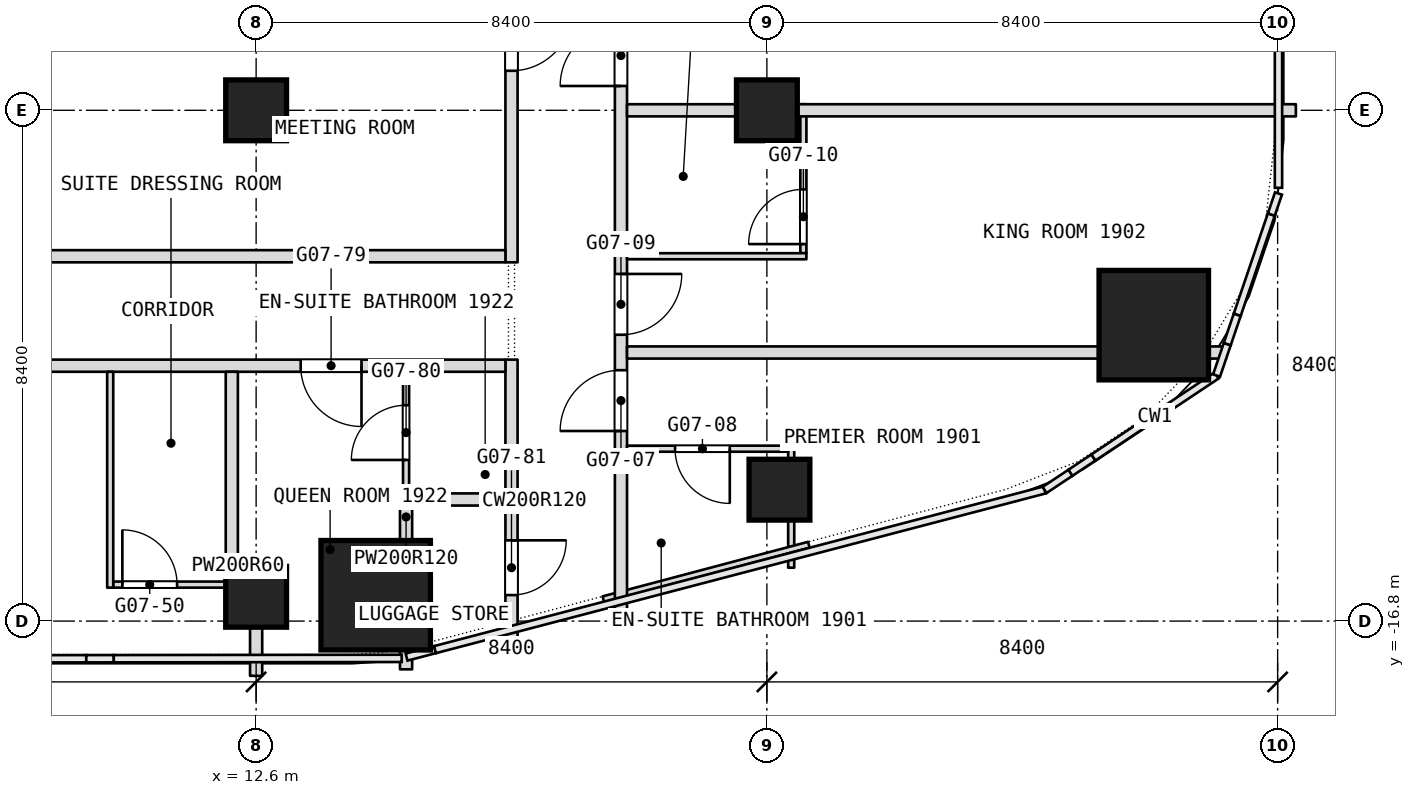
"""IFC4 building model, lengths in metres.
Left out: names, types, materials, properties, quantities, classifications, styles, units other than length and angle.
Written with IfcOpenShell. Run it as: python <this file> out.ifc"""

import sys

from ifc_helpers import new_model, si_unit, direction, frame, frame_2d, origin, origin_2d, place, context, subcontext, project, spatial, rectangle, extrude, element, fill, save


model = new_model("IFC4")
c1 = context("Model", 3, precision=1e-05, world=origin(), true_north=direction((0.0, 1.0)))
c2 = subcontext(c1, "Body", "Model", "MODEL_VIEW")
j1 = project(units=[si_unit("LENGTHUNIT", "METRE"), si_unit("PLANEANGLEUNIT", "RADIAN")], contexts=[c1])
p1 = place(None, origin())
s1 = spatial("IfcSite", under=j1, at=p1, CompositionType="ELEMENT")
p2 = place(p1, origin())
s2 = spatial("IfcBuilding", under=s1, at=p2, CompositionType="ELEMENT")
p3 = place(p2, frame((0.0, 0.0, 83.3)))
s3 = spatial("IfcBuildingStorey", under=s2, at=p3, CompositionType="ELEMENT", Elevation=83.3)
for number, where, z_axis, x_axis in (
    (1, (14.566, -16.375, 0.0), (0.0, 0.0, 1.0), (1.0, 0.0, 0.0)),
    (2, (27.363, -11.933, 0.0), (0.0, 0.0, 1.0), (1.0, 0.0, 0.0)),
):
    element("IfcColumn", number, at=place(p3, frame(where, z_axis=z_axis, x_axis=x_axis)), inside=s3, PredefinedType="COLUMN", context=c2, shape_type="SweptSolid", body=[
        extrude(rectangle(XDim=1.8, YDim=1.8, at=origin_2d()), origin(), (0.0, 0.0, 1.0), 3.6),
    ])
for number, where, z_axis, x_axis in (
    (3, (12.6, -8.4, 0.0), (0.0, 0.0, 1.0), (1.0, 0.0, 0.0)),
    (4, (21.0, -8.4, 0.0), (0.0, 0.0, 1.0), (1.0, 0.0, 0.0)),
    (5, (21.207, -14.639, 0.0), (0.0, 0.0, 1.0), (1.0, 0.0, 0.0)),
    (6, (12.6, -16.4, 0.0), (0.0, 0.0, 1.0), (1.0, 0.0, 0.0)),
):
    element("IfcColumn", number, at=place(p3, frame(where, z_axis=z_axis, x_axis=x_axis)), inside=s3, PredefinedType="COLUMN", context=c2, shape_type="SweptSolid", body=[
        extrude(rectangle(XDim=1.0, YDim=1.0, at=origin_2d()), origin(), (0.0, 0.0, 1.0), 3.6),
    ])
p4 = place(p3, frame((21.6, -10.75, 0.0), z_axis=(0.0, 0.0, 1.0), x_axis=(0.0, 1.0, 0.0)))
e7 = element("IfcWall", 7, at=p4, inside=s3, PredefinedType="PARTITIONING", context=c2, shape_type="SweptSolid", body=[
    extrude(rectangle(XDim=2.45, YDim=0.1, at=frame_2d((1.225, 0.0))), origin(), (0.0, 0.0, 1.0), 3.3),
])
p5 = place(p4, frame((0.15, 0.0, 0.0)))
e8 = element("IfcOpeningElement", 8, at=p5, cuts=e7, PredefinedType="OPENING", context=c2, shape_type="SweptSolid", body=[
    extrude(rectangle(XDim=0.9, YDim=2.1, at=frame_2d((0.45, 1.05))), frame((0.0, 0.05, 0.0), z_axis=(0.0, -1.0, 0.0), x_axis=(1.0, 0.0, 0.0)), (0.0, 0.0, 1.0), 0.1),
])
p6 = place(p3, frame((21.4, -15.922, 0.0), z_axis=(0.0, 0.0, 1.0), x_axis=(0.0, 1.0, 0.0)))
e9 = element("IfcWall", 9, at=p6, inside=s3, PredefinedType="PARTITIONING", context=c2, shape_type="SweptSolid", body=[
    extrude(rectangle(XDim=2.007, YDim=0.1, at=frame_2d((1.003, 0.0))), origin(), (0.0, 0.0, 1.0), 3.3),
])
p7 = place(p3, frame((18.31, -16.442, 0.0), z_axis=(0.0, 0.0, 1.0), x_axis=(0.966542484633, 0.25650657964, 0.0)))
e10 = element("IfcWall", 10, at=p7, inside=s3, PredefinedType="PARTITIONING", context=c2, shape_type="SweptSolid", body=[
    extrude(rectangle(XDim=3.497, YDim=0.1, at=frame_2d((1.749, 0.0))), origin(), (0.0, 0.0, 1.0), 3.3),
])
p8 = place(p3, frame((18.6, -16.665, 0.0), z_axis=(0.0, 0.0, 1.0), x_axis=(0.0, 1.0, 0.0)))
e11 = element("IfcWall", 11, at=p8, inside=s3, PredefinedType="PARTITIONING", context=c2, shape_type="SweptSolid", body=[
    extrude(rectangle(XDim=50.205, YDim=0.2, at=frame_2d((25.103, 0.0))), origin(), (0.0, 0.0, 1.0), 3.3),
])
p9 = place(p8, frame((2.991, 0.0, 0.0)))
e12 = element("IfcOpeningElement", 12, at=p9, cuts=e11, PredefinedType="OPENING", context=c2, shape_type="SweptSolid", body=[
    extrude(rectangle(XDim=1.0, YDim=2.1, at=frame_2d((0.5, 1.05))), frame((0.0, 0.1, 0.0), z_axis=(0.0, -1.0, 0.0), x_axis=(1.0, 0.0, 0.0)), (0.0, 0.0, 1.0), 0.2),
])
p10 = place(p8, frame((4.574, 0.0, 0.0)))
e13 = element("IfcOpeningElement", 13, at=p10, cuts=e11, PredefinedType="OPENING", context=c2, shape_type="SweptSolid", body=[
    extrude(rectangle(XDim=1.0, YDim=2.1, at=frame_2d((0.5, 1.05))), frame((0.0, 0.1, 0.0), z_axis=(0.0, -1.0, 0.0), x_axis=(1.0, 0.0, 0.0)), (0.0, 0.0, 1.0), 0.2),
])
p11 = place(p8, frame((8.665, 0.0, 0.0)))
e14 = element("IfcOpeningElement", 14, at=p11, cuts=e11, PredefinedType="OPENING", context=c2, shape_type="SweptSolid", body=[
    extrude(rectangle(XDim=1.0, YDim=2.1, at=frame_2d((0.5, 1.05))), frame((0.0, 0.1, 0.0), z_axis=(0.0, -1.0, 0.0), x_axis=(1.0, 0.0, 0.0)), (0.0, 0.0, 1.0), 0.2),
])
p12 = place(p8, frame((15.265, 0.0, 0.0)))
e15 = element("IfcOpeningElement", 15, at=p12, cuts=e11, PredefinedType="OPENING", context=c2, shape_type="SweptSolid", body=[
    extrude(rectangle(XDim=1.0, YDim=2.1, at=frame_2d((0.5, 1.05))), frame((0.0, 0.1, 0.0), z_axis=(0.0, -1.0, 0.0), x_axis=(1.0, 0.0, 0.0)), (0.0, 0.0, 1.0), 0.2),
])
p13 = place(p8, frame((19.465, 0.0, 0.0)))
e16 = element("IfcOpeningElement", 16, at=p13, cuts=e11, PredefinedType="OPENING", context=c2, shape_type="SweptSolid", body=[
    extrude(rectangle(XDim=1.0, YDim=2.1, at=frame_2d((0.5, 1.05))), frame((0.0, 0.1, 0.0), z_axis=(0.0, -1.0, 0.0), x_axis=(1.0, 0.0, 0.0)), (0.0, 0.0, 1.0), 0.2),
])
p14 = place(p8, frame((21.265, 0.0, 0.0)))
e17 = element("IfcOpeningElement", 17, at=p14, cuts=e11, PredefinedType="OPENING", context=c2, shape_type="SweptSolid", body=[
    extrude(rectangle(XDim=1.0, YDim=2.1, at=frame_2d((0.5, 1.05))), frame((0.0, 0.1, 0.0), z_axis=(0.0, -1.0, 0.0), x_axis=(1.0, 0.0, 0.0)), (0.0, 0.0, 1.0), 0.2),
])
p15 = place(p8, frame((25.465, 0.0, 0.0)))
e18 = element("IfcOpeningElement", 18, at=p15, cuts=e11, PredefinedType="OPENING", context=c2, shape_type="SweptSolid", body=[
    extrude(rectangle(XDim=1.0, YDim=2.1, at=frame_2d((0.5, 1.05))), frame((0.0, 0.1, 0.0), z_axis=(0.0, -1.0, 0.0), x_axis=(1.0, 0.0, 0.0)), (0.0, 0.0, 1.0), 0.2),
])
p16 = place(p8, frame((32.065, 0.0, 0.0)))
e19 = element("IfcOpeningElement", 19, at=p16, cuts=e11, PredefinedType="OPENING", context=c2, shape_type="SweptSolid", body=[
    extrude(rectangle(XDim=1.0, YDim=2.1, at=frame_2d((0.5, 1.05))), frame((0.0, 0.1, 0.0), z_axis=(0.0, -1.0, 0.0), x_axis=(1.0, 0.0, 0.0)), (0.0, 0.0, 1.0), 0.2),
])
p17 = place(p8, frame((36.265, 0.0, 0.0)))
e20 = element("IfcOpeningElement", 20, at=p17, cuts=e11, PredefinedType="OPENING", context=c2, shape_type="SweptSolid", body=[
    extrude(rectangle(XDim=1.0, YDim=2.1, at=frame_2d((0.5, 1.05))), frame((0.0, 0.1, 0.0), z_axis=(0.0, -1.0, 0.0), x_axis=(1.0, 0.0, 0.0)), (0.0, 0.0, 1.0), 0.2),
])
p18 = place(p8, frame((38.065, 0.0, 0.0)))
e21 = element("IfcOpeningElement", 21, at=p18, cuts=e11, PredefinedType="OPENING", context=c2, shape_type="SweptSolid", body=[
    extrude(rectangle(XDim=1.0, YDim=2.1, at=frame_2d((0.5, 1.05))), frame((0.0, 0.1, 0.0), z_axis=(0.0, -1.0, 0.0), x_axis=(1.0, 0.0, 0.0)), (0.0, 0.0, 1.0), 0.2),
])
p19 = place(p8, frame((42.265, 0.0, 0.0)))
e22 = element("IfcOpeningElement", 22, at=p19, cuts=e11, PredefinedType="OPENING", context=c2, shape_type="SweptSolid", body=[
    extrude(rectangle(XDim=1.0, YDim=2.1, at=frame_2d((0.5, 1.05))), frame((0.0, 0.1, 0.0), z_axis=(0.0, -1.0, 0.0), x_axis=(1.0, 0.0, 0.0)), (0.0, 0.0, 1.0), 0.2),
])
p20 = place(p8, frame((46.365, 0.0, 0.0)))
e23 = element("IfcOpeningElement", 23, at=p20, cuts=e11, PredefinedType="OPENING", context=c2, shape_type="SweptSolid", body=[
    extrude(rectangle(XDim=1.0, YDim=2.1, at=frame_2d((0.5, 1.05))), frame((0.0, 0.1, 0.0), z_axis=(0.0, -1.0, 0.0), x_axis=(1.0, 0.0, 0.0)), (0.0, 0.0, 1.0), 0.2),
])
p21 = place(p3, frame((16.8, -17.143, 0.0), z_axis=(0.0, 0.0, 1.0), x_axis=(0.0, 1.0, 0.0)))
e24 = element("IfcWall", 24, at=p21, inside=s3, PredefinedType="PARTITIONING", context=c2, shape_type="SweptSolid", body=[
    extrude(rectangle(XDim=4.643, YDim=0.2, at=frame_2d((2.322, 0.0))), origin(), (0.0, 0.0, 1.0), 3.3),
])
p22 = place(p21, frame((0.771, 0.0, 0.0)))
e25 = element("IfcOpeningElement", 25, at=p22, cuts=e24, PredefinedType="OPENING", context=c2, shape_type="SweptSolid", body=[
    extrude(rectangle(XDim=0.9, YDim=2.1, at=frame_2d((0.45, 1.05))), frame((0.0, 0.1, 0.0), z_axis=(0.0, -1.0, 0.0), x_axis=(1.0, 0.0, 0.0)), (0.0, 0.0, 1.0), 0.2),
])
p23 = place(p3, frame((16.8, -10.9, 0.0), z_axis=(0.0, 0.0, 1.0), x_axis=(0.0, 1.0, 0.0)))
e26 = element("IfcWall", 26, at=p23, inside=s3, PredefinedType="PARTITIONING", context=c2, shape_type="SweptSolid", body=[
    extrude(rectangle(XDim=7.3, YDim=0.2, at=frame_2d((3.65, 0.0))), origin(), (0.0, 0.0, 1.0), 3.3),
])
p24 = place(p23, frame((3.15, 0.0, 0.0)))
e27 = element("IfcOpeningElement", 27, at=p24, cuts=e26, PredefinedType="OPENING", context=c2, shape_type="SweptSolid", body=[
    extrude(rectangle(XDim=1.0, YDim=2.1, at=frame_2d((0.5, 1.05))), frame((0.0, 0.1, 0.0), z_axis=(0.0, -1.0, 0.0), x_axis=(1.0, 0.0, 0.0)), (0.0, 0.0, 1.0), 0.2),
])
p25 = place(p3, frame((10.25, -16.2, 0.0), z_axis=(0.0, 0.0, 1.0), x_axis=(1.0, 0.0, 0.0)))
e28 = element("IfcWall", 28, at=p25, inside=s3, PredefinedType="PARTITIONING", context=c2, shape_type="SweptSolid", body=[
    extrude(rectangle(XDim=2.45, YDim=0.1, at=frame_2d((1.225, 0.0))), origin(), (0.0, 0.0, 1.0), 3.3),
])
p26 = place(p25, frame((0.15, 0.0, 0.0)))
e29 = element("IfcOpeningElement", 29, at=p26, cuts=e28, PredefinedType="OPENING", context=c2, shape_type="SweptSolid", body=[
    extrude(rectangle(XDim=0.9, YDim=2.1, at=frame_2d((0.45, 1.05))), frame((0.0, 0.05, 0.0), z_axis=(0.0, -1.0, 0.0), x_axis=(1.0, 0.0, 0.0)), (0.0, 0.0, 1.0), 0.1),
])
p27 = place(p3, frame((12.1, -15.9, 0.0), z_axis=(0.0, 0.0, 1.0), x_axis=(1.0, 0.0, 0.0)))
e30 = element("IfcWall", 30, at=p27, inside=s3, PredefinedType="PARTITIONING", context=c2, shape_type="SweptSolid", body=[
    extrude(rectangle(XDim=0.4, YDim=0.2, at=frame_2d((0.2, 0.0))), origin(), (0.0, 0.0, 1.0), 3.3),
])
p28 = place(p3, frame((15.066, -17.593, 0.0), z_axis=(0.0, 0.0, 1.0), x_axis=(0.0, 1.0, 0.0)))
e31 = element("IfcWall", 31, at=p28, inside=s3, PredefinedType="PARTITIONING", context=c2, shape_type="SweptSolid", body=[
    extrude(rectangle(XDim=0.318, YDim=0.2, at=frame_2d((0.159, 0.0))), origin(), (0.0, 0.0, 1.0), 3.3),
])
p29 = place(p3, frame((15.066, -15.475, 0.0), z_axis=(0.0, 0.0, 1.0), x_axis=(0.0, 1.0, 0.0)))
e32 = element("IfcWall", 32, at=p29, inside=s3, PredefinedType="PARTITIONING", context=c2, shape_type="SweptSolid", body=[
    extrude(rectangle(XDim=0.775, YDim=0.2, at=frame_2d((0.388, 0.0))), origin(), (0.0, 0.0, 1.0), 3.3),
])
p30 = place(p3, frame((15.066, -14.9, 0.0), z_axis=(0.0, 0.0, 1.0), x_axis=(0.0, 1.0, 0.0)))
e33 = element("IfcWall", 33, at=p30, inside=s3, PredefinedType="PARTITIONING", context=c2, shape_type="SweptSolid", body=[
    extrude(rectangle(XDim=2.2, YDim=0.1, at=frame_2d((1.1, 0.0))), origin(), (0.0, 0.0, 1.0), 3.3),
])
p31 = place(p30, frame((0.75, 0.0, 0.0)))
e34 = element("IfcOpeningElement", 34, at=p31, cuts=e33, PredefinedType="OPENING", context=c2, shape_type="SweptSolid", body=[
    extrude(rectangle(XDim=0.9, YDim=2.1, at=frame_2d((0.45, 1.05))), frame((0.0, 0.05, 0.0), z_axis=(0.0, -1.0, 0.0), x_axis=(1.0, 0.0, 0.0)), (0.0, 0.0, 1.0), 0.1),
])
p32 = place(p3, frame((15.116, -14.8, 0.0), z_axis=(0.0, 0.0, 1.0), x_axis=(1.0, 0.0, 0.0)))
e35 = element("IfcWall", 35, at=p32, inside=s3, PredefinedType="PARTITIONING", context=c2, shape_type="SweptSolid", body=[
    extrude(rectangle(XDim=1.584, YDim=0.2, at=frame_2d((0.792, 0.0))), origin(), (0.0, 0.0, 1.0), 3.3),
])
p33 = place(p3, frame((18.7, -13.965, 0.0), z_axis=(0.0, 0.0, 1.0), x_axis=(1.0, 0.0, 0.0)))
e36 = element("IfcWall", 36, at=p33, inside=s3, PredefinedType="PARTITIONING", context=c2, shape_type="SweptSolid", body=[
    extrude(rectangle(XDim=2.65, YDim=0.1, at=frame_2d((1.325, 0.0))), origin(), (0.0, 0.0, 1.0), 3.3),
])
p34 = place(p33, frame((0.79, 0.0, 0.0)))
e37 = element("IfcOpeningElement", 37, at=p34, cuts=e36, PredefinedType="OPENING", context=c2, shape_type="SweptSolid", body=[
    extrude(rectangle(XDim=0.9, YDim=2.1, at=frame_2d((0.45, 1.05))), frame((0.0, 0.05, 0.0), z_axis=(0.0, -1.0, 0.0), x_axis=(1.0, 0.0, 0.0)), (0.0, 0.0, 1.0), 0.1),
])
p35 = place(p3, frame((12.6, -17.7, 0.0), z_axis=(0.0, 0.0, 1.0), x_axis=(0.0, 1.0, 0.0)))
e38 = element("IfcWall", 38, at=p35, inside=s3, PredefinedType="PARTITIONING", context=c2, shape_type="SweptSolid", body=[
    extrude(rectangle(XDim=1.9, YDim=0.2, at=frame_2d((0.95, 0.0))), origin(), (0.0, 0.0, 1.0), 2.742),
])
p36 = place(p3, frame((-16.7, -12.6, 0.0), z_axis=(0.0, 0.0, 1.0), x_axis=(1.0, 0.0, 0.0)))
e39 = element("IfcWall", 39, at=p36, inside=s3, PredefinedType="PARTITIONING", context=c2, shape_type="SweptSolid", body=[
    extrude(rectangle(XDim=33.4, YDim=0.2, at=frame_2d((16.7, 0.0))), origin(), (0.0, 0.0, 1.0), 3.3),
])
p37 = place(p36, frame((7.8, 0.0, 0.0)))
e40 = element("IfcOpeningElement", 40, at=p37, cuts=e39, PredefinedType="OPENING", context=c2, shape_type="SweptSolid", body=[
    extrude(rectangle(XDim=1.1, YDim=2.1, at=frame_2d((0.55, 1.05))), frame((0.0, 0.1, 0.0), z_axis=(0.0, -1.0, 0.0), x_axis=(1.0, 0.0, 0.0)), (0.0, 0.0, 1.0), 0.2),
])
p38 = place(p36, frame((12.9, 0.0, 0.0)))
e41 = element("IfcOpeningElement", 41, at=p38, cuts=e39, PredefinedType="OPENING", context=c2, shape_type="SweptSolid", body=[
    extrude(rectangle(XDim=1.0, YDim=2.1, at=frame_2d((0.5, 1.05))), frame((0.0, 0.1, 0.0), z_axis=(0.0, -1.0, 0.0), x_axis=(1.0, 0.0, 0.0)), (0.0, 0.0, 1.0), 0.2),
])
p39 = place(p36, frame((19.5, 0.0, 0.0)))
e42 = element("IfcOpeningElement", 42, at=p39, cuts=e39, PredefinedType="OPENING", context=c2, shape_type="SweptSolid", body=[
    extrude(rectangle(XDim=1.0, YDim=2.1, at=frame_2d((0.5, 1.05))), frame((0.0, 0.1, 0.0), z_axis=(0.0, -1.0, 0.0), x_axis=(1.0, 0.0, 0.0)), (0.0, 0.0, 1.0), 0.2),
])
p40 = place(p36, frame((24.6, 0.0, 0.0)))
e43 = element("IfcOpeningElement", 43, at=p40, cuts=e39, PredefinedType="OPENING", context=c2, shape_type="SweptSolid", body=[
    extrude(rectangle(XDim=1.1, YDim=2.1, at=frame_2d((0.55, 1.05))), frame((0.0, 0.1, 0.0), z_axis=(0.0, -1.0, 0.0), x_axis=(1.0, 0.0, 0.0)), (0.0, 0.0, 1.0), 0.2),
])
p41 = place(p36, frame((2.367, 0.0, 0.0)))
e44 = element("IfcOpeningElement", 44, at=p41, cuts=e39, PredefinedType="OPENING", context=c2, shape_type="SweptSolid", body=[
    extrude(rectangle(XDim=1.0, YDim=2.1, at=frame_2d((0.5, 1.05))), frame((0.0, 0.1, 0.0), z_axis=(0.0, -1.0, 0.0), x_axis=(1.0, 0.0, 0.0)), (0.0, 0.0, 1.0), 0.2),
])
p42 = place(p36, frame((30.033, 0.0, 0.0)))
e45 = element("IfcOpeningElement", 45, at=p42, cuts=e39, PredefinedType="OPENING", context=c2, shape_type="SweptSolid", body=[
    extrude(rectangle(XDim=1.0, YDim=2.1, at=frame_2d((0.5, 1.05))), frame((0.0, 0.1, 0.0), z_axis=(0.0, -1.0, 0.0), x_axis=(1.0, 0.0, 0.0)), (0.0, 0.0, 1.0), 0.2),
])
p43 = place(p3, frame((18.7, -12.383, 0.0), z_axis=(0.0, 0.0, 1.0), x_axis=(1.0, 0.0, 0.0)))
e46 = element("IfcWall", 46, at=p43, inside=s3, PredefinedType="PARTITIONING", context=c2, shape_type="SweptSolid", body=[
    extrude(rectangle(XDim=7.763, YDim=0.2, at=frame_2d((3.881, 0.0))), origin(), (0.0, 0.0, 1.0), 3.3),
])
p44 = place(p3, frame((28.263, -12.383, 0.0), z_axis=(0.0, 0.0, 1.0), x_axis=(1.0, 0.0, 0.0)))
e47 = element("IfcWall", 47, at=p44, inside=s3, PredefinedType="PARTITIONING", context=c2, shape_type="SweptSolid", body=[
    extrude(rectangle(XDim=0.29, YDim=0.2, at=frame_2d((0.145, 0.0))), origin(), (0.0, 0.0, 1.0), 3.3),
])
p45 = place(p3, frame((12.2, -15.8, 0.0), z_axis=(0.0, 0.0, 1.0), x_axis=(0.0, 1.0, 0.0)))
e48 = element("IfcWall", 48, at=p45, inside=s3, PredefinedType="PARTITIONING", context=c2, shape_type="SweptSolid", body=[
    extrude(rectangle(XDim=3.1, YDim=0.2, at=frame_2d((1.55, 0.0))), origin(), (0.0, 0.0, 1.0), 3.3),
])
p46 = place(p3, frame((18.7, -10.8, 0.0), z_axis=(0.0, 0.0, 1.0), x_axis=(1.0, 0.0, 0.0)))
e49 = element("IfcWall", 49, at=p46, inside=s3, PredefinedType="PARTITIONING", context=c2, shape_type="SweptSolid", body=[
    extrude(rectangle(XDim=2.95, YDim=0.1, at=frame_2d((1.475, 0.0))), origin(), (0.0, 0.0, 1.0), 3.3),
])
p47 = place(p3, frame((-4.1, -10.8, 0.0), z_axis=(0.0, 0.0, 1.0), x_axis=(1.0, 0.0, 0.0)))
e50 = element("IfcWall", 50, at=p47, inside=s3, PredefinedType="PARTITIONING", context=c2, shape_type="SweptSolid", body=[
    extrude(rectangle(XDim=20.8, YDim=0.2, at=frame_2d((10.4, 0.0))), origin(), (0.0, 0.0, 1.0), 3.3),
])
p48 = place(p47, frame((3.7, 0.0, 0.0)))
e51 = element("IfcOpeningElement", 51, at=p48, cuts=e50, PredefinedType="OPENING", context=c2, shape_type="SweptSolid", body=[
    extrude(rectangle(XDim=1.0, YDim=2.1, at=frame_2d((0.5, 1.05))), frame((0.0, 0.1, 0.0), z_axis=(0.0, -1.0, 0.0), x_axis=(1.0, 0.0, 0.0)), (0.0, 0.0, 1.0), 0.2),
])
p49 = place(p3, frame((10.2, -16.25, 0.0), z_axis=(0.0, 0.0, 1.0), x_axis=(0.0, 1.0, 0.0)))
e52 = element("IfcWall", 52, at=p49, inside=s3, PredefinedType="PARTITIONING", context=c2, shape_type="SweptSolid", body=[
    extrude(rectangle(XDim=3.55, YDim=0.1, at=frame_2d((1.775, 0.0))), origin(), (0.0, 0.0, 1.0), 3.3),
])
p50 = place(p3, frame((18.7, -8.4, 0.0), z_axis=(0.0, 0.0, 1.0), x_axis=(1.0, 0.0, 0.0)))
e53 = element("IfcWall", 53, at=p50, inside=s3, PredefinedType="PARTITIONING", context=c2, shape_type="SweptSolid", body=[
    extrude(rectangle(XDim=11.0, YDim=0.2, at=frame_2d((5.5, 0.0))), origin(), (0.0, 0.0, 1.0), 2.8),
])
p51 = place(p5, origin())
e54 = element("IfcDoor", 54, at=p51, inside=s3, OperationType="SINGLE_SWING_LEFT", PredefinedType="DOOR", context=c2, shape_type="SweptSolid", body=[
    extrude(rectangle(XDim=0.9, YDim=2.1, at=frame_2d((0.45, 1.05))), frame((0.0, 0.025, 0.0), z_axis=(0.0, -1.0, 0.0), x_axis=(1.0, 0.0, 0.0)), (0.0, 0.0, 1.0), 0.05),
])
fill(e8, e54)
p52 = place(p9, origin())
e55 = element("IfcDoor", 55, at=p52, inside=s3, OperationType="SINGLE_SWING_LEFT", PredefinedType="DOOR", context=c2, shape_type="SweptSolid", body=[
    extrude(rectangle(XDim=1.0, YDim=2.1, at=frame_2d((0.5, 1.05))), frame((0.0, 0.025, 0.0), z_axis=(0.0, -1.0, 0.0), x_axis=(1.0, 0.0, 0.0)), (0.0, 0.0, 1.0), 0.05),
])
fill(e12, e55)
p53 = place(p10, origin())
e56 = element("IfcDoor", 56, at=p53, inside=s3, OperationType="SINGLE_SWING_LEFT", PredefinedType="DOOR", context=c2, shape_type="SweptSolid", body=[
    extrude(rectangle(XDim=1.0, YDim=2.1, at=frame_2d((0.5, 1.05))), frame((0.0, 0.025, 0.0), z_axis=(0.0, -1.0, 0.0), x_axis=(1.0, 0.0, 0.0)), (0.0, 0.0, 1.0), 0.05),
])
fill(e13, e56)
p54 = place(p11, origin())
e57 = element("IfcDoor", 57, at=p54, inside=s3, OperationType="SINGLE_SWING_LEFT", PredefinedType="DOOR", context=c2, shape_type="SweptSolid", body=[
    extrude(rectangle(XDim=1.0, YDim=2.1, at=frame_2d((0.5, 1.05))), frame((0.0, 0.025, 0.0), z_axis=(0.0, -1.0, 0.0), x_axis=(1.0, 0.0, 0.0)), (0.0, 0.0, 1.0), 0.05),
])
fill(e14, e57)
p55 = place(p22, origin())
e58 = element("IfcDoor", 58, at=p55, inside=s3, OperationType="SINGLE_SWING_RIGHT", PredefinedType="DOOR", context=c2, shape_type="SweptSolid", body=[
    extrude(rectangle(XDim=0.9, YDim=2.1, at=frame_2d((0.45, 1.05))), frame((0.0, 0.025, 0.0), z_axis=(0.0, -1.0, 0.0), x_axis=(1.0, 0.0, 0.0)), (0.0, 0.0, 1.0), 0.05),
])
fill(e25, e58)
p56 = place(p24, origin())
e59 = element("IfcDoor", 59, at=p56, inside=s3, OperationType="SINGLE_SWING_RIGHT", PredefinedType="DOOR", context=c2, shape_type="SweptSolid", body=[
    extrude(rectangle(XDim=1.0, YDim=2.1, at=frame_2d((0.5, 1.05))), frame((0.0, 0.025, 0.0), z_axis=(0.0, -1.0, 0.0), x_axis=(1.0, 0.0, 0.0)), (0.0, 0.0, 1.0), 0.05),
])
fill(e27, e59)
p57 = place(p26, origin())
e60 = element("IfcDoor", 60, at=p57, inside=s3, OperationType="SINGLE_SWING_LEFT", PredefinedType="DOOR", context=c2, shape_type="SweptSolid", body=[
    extrude(rectangle(XDim=0.9, YDim=2.1, at=frame_2d((0.45, 1.05))), frame((0.0, 0.025, 0.0), z_axis=(0.0, -1.0, 0.0), x_axis=(1.0, 0.0, 0.0)), (0.0, 0.0, 1.0), 0.05),
])
fill(e29, e60)
p58 = place(p31, origin())
e61 = element("IfcDoor", 61, at=p58, inside=s3, OperationType="SINGLE_SWING_RIGHT", PredefinedType="DOOR", context=c2, shape_type="SweptSolid", body=[
    extrude(rectangle(XDim=0.9, YDim=2.1, at=frame_2d((0.45, 1.05))), frame((0.0, 0.025, 0.0), z_axis=(0.0, -1.0, 0.0), x_axis=(1.0, 0.0, 0.0)), (0.0, 0.0, 1.0), 0.05),
])
fill(e34, e61)
p59 = place(p34, origin())
e62 = element("IfcDoor", 62, at=p59, inside=s3, OperationType="SINGLE_SWING_LEFT", PredefinedType="DOOR", context=c2, shape_type="SweptSolid", body=[
    extrude(rectangle(XDim=0.9, YDim=2.1, at=frame_2d((0.45, 1.05))), frame((0.0, 0.025, 0.0), z_axis=(0.0, -1.0, 0.0), x_axis=(1.0, 0.0, 0.0)), (0.0, 0.0, 1.0), 0.05),
])
fill(e37, e62)
p60 = place(p42, origin())
e63 = element("IfcDoor", 63, at=p60, inside=s3, OperationType="SINGLE_SWING_LEFT", PredefinedType="DOOR", context=c2, shape_type="SweptSolid", body=[
    extrude(rectangle(XDim=1.0, YDim=2.1, at=frame_2d((0.5, 1.05))), frame((0.0, 0.025, 0.0), z_axis=(0.0, -1.0, 0.0), x_axis=(1.0, 0.0, 0.0)), (0.0, 0.0, 1.0), 0.05),
])
fill(e45, e63)
save(model, sys.argv[1])
